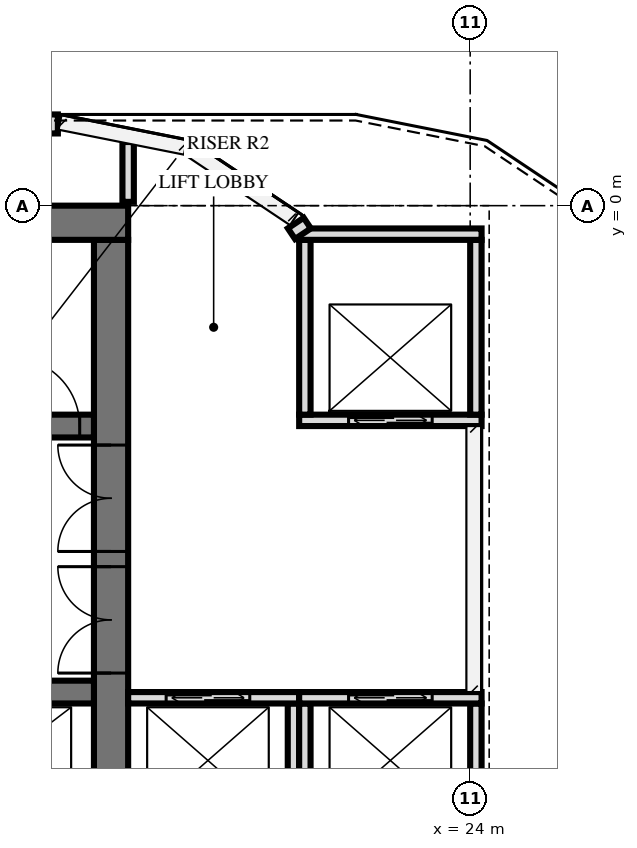
"""IFC4 building model, lengths in metres.
Left out: names, types, materials, properties, quantities, classifications, styles, units other than length and angle.
Written with IfcOpenShell. Run it as: python <this file> out.ifc"""

import sys

from ifc_helpers import new_model, si_unit, direction, frame, frame_2d, origin, place, context, subcontext, project, spatial, rectangle, extrude, element, fill, save


model = new_model("IFC4")
c1 = context("Model", 3, precision=1e-05, world=origin(), true_north=direction((0.0, 1.0)))
c2 = subcontext(c1, "Body", "Model", "MODEL_VIEW")
j1 = project(units=[si_unit("LENGTHUNIT", "METRE"), si_unit("PLANEANGLEUNIT", "RADIAN")], contexts=[c1])
p1 = place(None, origin())
s1 = spatial("IfcSite", under=j1, at=p1, CompositionType="ELEMENT")
p2 = place(p1, origin())
s2 = spatial("IfcBuilding", under=s1, at=p2, CompositionType="ELEMENT")
p3 = place(p2, frame((0.0, 0.0, 246.6)))
s3 = spatial("IfcBuildingStorey", under=s2, at=p3, CompositionType="ELEMENT", Elevation=246.6)
p4 = place(p3, frame((10.0, -0.225, 0.0), z_axis=(0.0, 0.0, 1.0), x_axis=(1.0, 0.0, 0.0)))
e1 = element("IfcWall", 1, at=p4, inside=s3, PredefinedType="SHEAR", context=c2, shape_type="SweptSolid", body=[
    extrude(rectangle(XDim=9.5, YDim=0.45, at=frame_2d((4.75, 0.0))), origin(), (0.0, 0.0, 1.0), 6.0),
])
p5 = place(p3, frame((19.275, -14.55, 0.0), z_axis=(0.0, 0.0, 1.0), x_axis=(0.0, 1.0, 0.0)))
e2 = element("IfcWall", 2, at=p5, inside=s3, PredefinedType="SHEAR", context=c2, shape_type="SweptSolid", body=[
    extrude(rectangle(XDim=14.1, YDim=0.45, at=frame_2d((7.05, 0.0))), origin(), (0.0, 0.0, 1.0), 6.0),
])
p6 = place(p5, frame((8.4, 0.0, 0.0)))
e3 = element("IfcOpeningElement", 3, at=p6, cuts=e2, PredefinedType="OPENING", context=c2, shape_type="SweptSolid", body=[
    extrude(rectangle(XDim=1.4, YDim=2.4, at=frame_2d((0.7, 1.2))), frame((0.0, 0.235, 0.0), z_axis=(0.0, -1.0, 0.0), x_axis=(1.0, 0.0, 0.0)), (0.0, 0.0, 1.0), 0.47),
])
p7 = place(p5, frame((10.0, 0.0, 0.0)))
e4 = element("IfcOpeningElement", 4, at=p7, cuts=e2, PredefinedType="OPENING", context=c2, shape_type="SweptSolid", body=[
    extrude(rectangle(XDim=1.4, YDim=2.4, at=frame_2d((0.7, 1.2))), frame((0.0, 0.235, 0.0), z_axis=(0.0, -1.0, 0.0), x_axis=(1.0, 0.0, 0.0)), (0.0, 0.0, 1.0), 0.47),
])
p8 = place(p3, frame((10.35, -2.9, 0.0), z_axis=(0.0, 0.0, 1.0), x_axis=(1.0, 0.0, 0.0)))
e5 = element("IfcWall", 5, at=p8, inside=s3, PredefinedType="SHEAR", context=c2, shape_type="SweptSolid", body=[
    extrude(rectangle(XDim=8.7, YDim=0.3, at=frame_2d((4.35, 0.0))), origin(), (0.0, 0.0, 1.0), 6.0),
])
p9 = place(p8, frame((0.8, 0.0, 0.0)))
e6 = element("IfcOpeningElement", 6, at=p9, cuts=e5, PredefinedType="OPENING", context=c2, shape_type="SweptSolid", body=[
    extrude(rectangle(XDim=1.1, YDim=2.1, at=frame_2d((0.55, 1.05))), frame((0.0, 0.16, 0.0), z_axis=(0.0, -1.0, 0.0), x_axis=(1.0, 0.0, 0.0)), (0.0, 0.0, 1.0), 0.32),
])
p10 = place(p8, frame((3.8, 0.0, 0.0)))
e7 = element("IfcOpeningElement", 7, at=p10, cuts=e5, PredefinedType="OPENING", context=c2, shape_type="SweptSolid", body=[
    extrude(rectangle(XDim=1.1, YDim=2.1, at=frame_2d((0.55, 1.05))), frame((0.0, 0.16, 0.0), z_axis=(0.0, -1.0, 0.0), x_axis=(1.0, 0.0, 0.0)), (0.0, 0.0, 1.0), 0.32),
])
p11 = place(p8, frame((6.188, 0.0, 0.0)))
e8 = element("IfcOpeningElement", 8, at=p11, cuts=e5, PredefinedType="OPENING", context=c2, shape_type="SweptSolid", body=[
    extrude(rectangle(XDim=0.9, YDim=2.1, at=frame_2d((0.45, 1.05))), frame((0.0, 0.16, 0.0), z_axis=(0.0, -1.0, 0.0), x_axis=(1.0, 0.0, 0.0)), (0.0, 0.0, 1.0), 0.32),
])
p12 = place(p8, frame((7.613, 0.0, 0.0)))
e9 = element("IfcOpeningElement", 9, at=p12, cuts=e5, PredefinedType="OPENING", context=c2, shape_type="SweptSolid", body=[
    extrude(rectangle(XDim=0.9, YDim=2.1, at=frame_2d((0.45, 1.05))), frame((0.0, 0.16, 0.0), z_axis=(0.0, -1.0, 0.0), x_axis=(1.0, 0.0, 0.0)), (0.0, 0.0, 1.0), 0.32),
])
p13 = place(p3, frame((10.35, -6.4, 0.0), z_axis=(0.0, 0.0, 1.0), x_axis=(1.0, 0.0, 0.0)))
e10 = element("IfcWall", 10, at=p13, inside=s3, PredefinedType="SHEAR", context=c2, shape_type="SweptSolid", body=[
    extrude(rectangle(XDim=8.7, YDim=0.3, at=frame_2d((4.35, 0.0))), origin(), (0.0, 0.0, 1.0), 6.0),
])
p14 = place(p13, frame((6.8, 0.0, 0.0)))
e11 = element("IfcOpeningElement", 11, at=p14, cuts=e10, PredefinedType="OPENING", context=c2, shape_type="SweptSolid", body=[
    extrude(rectangle(XDim=1.1, YDim=2.1, at=frame_2d((0.55, 1.05))), frame((0.0, 0.16, 0.0), z_axis=(0.0, -1.0, 0.0), x_axis=(1.0, 0.0, 0.0)), (0.0, 0.0, 1.0), 0.32),
])
p15 = place(p3, frame((21.8, -0.369, 0.0), z_axis=(0.0, 0.0, 1.0), x_axis=(-0.555699055242, 0.831383521609, 0.0)))
e12 = element("IfcWall", 12, at=p15, inside=s3, PredefinedType="SOLIDWALL", context=c2, shape_type="SweptSolid", body=[
    extrude(rectangle(XDim=0.169, YDim=0.25, at=frame_2d((0.084, 0.0))), origin(), (0.0, 0.0, 1.0), 5.72),
])
p16 = place(p3, frame((18.575, 1.075, 0.0), z_axis=(0.0, 0.0, 1.0), x_axis=(-1.0, 0.0, 0.0)))
e13 = element("IfcWall", 13, at=p16, inside=s3, PredefinedType="SOLIDWALL", context=c2, shape_type="SweptSolid", body=[
    extrude(rectangle(XDim=37.151, YDim=0.25, at=frame_2d((18.575, 0.0))), origin(), (0.0, 0.0, 1.0), 5.72),
])
p17 = place(p16, frame((0.348, 0.0, 0.858)))
e14 = element("IfcOpeningElement", 14, at=p17, cuts=e13, PredefinedType="OPENING", context=c2, shape_type="SweptSolid", body=[
    extrude(rectangle(XDim=2.4, YDim=3.6, at=frame_2d((1.2, 1.8))), frame((0.0, 0.135, 0.0), z_axis=(0.0, -1.0, 0.0), x_axis=(1.0, 0.0, 0.0)), (0.0, 0.0, 1.0), 0.27),
])
p18 = place(p16, frame((3.444, 0.0, 0.858)))
e15 = element("IfcOpeningElement", 15, at=p18, cuts=e13, PredefinedType="OPENING", context=c2, shape_type="SweptSolid", body=[
    extrude(rectangle(XDim=2.4, YDim=3.6, at=frame_2d((1.2, 1.8))), frame((0.0, 0.135, 0.0), z_axis=(0.0, -1.0, 0.0), x_axis=(1.0, 0.0, 0.0)), (0.0, 0.0, 1.0), 0.27),
])
p19 = place(p16, frame((6.54, 0.0, 0.858)))
e16 = element("IfcOpeningElement", 16, at=p19, cuts=e13, PredefinedType="OPENING", context=c2, shape_type="SweptSolid", body=[
    extrude(rectangle(XDim=2.4, YDim=3.6, at=frame_2d((1.2, 1.8))), frame((0.0, 0.135, 0.0), z_axis=(0.0, -1.0, 0.0), x_axis=(1.0, 0.0, 0.0)), (0.0, 0.0, 1.0), 0.27),
])
p20 = place(p16, frame((9.635, 0.0, 0.858)))
e17 = element("IfcOpeningElement", 17, at=p20, cuts=e13, PredefinedType="OPENING", context=c2, shape_type="SweptSolid", body=[
    extrude(rectangle(XDim=2.4, YDim=3.6, at=frame_2d((1.2, 1.8))), frame((0.0, 0.135, 0.0), z_axis=(0.0, -1.0, 0.0), x_axis=(1.0, 0.0, 0.0)), (0.0, 0.0, 1.0), 0.27),
])
p21 = place(p16, frame((12.731, 0.0, 0.858)))
e18 = element("IfcOpeningElement", 18, at=p21, cuts=e13, PredefinedType="OPENING", context=c2, shape_type="SweptSolid", body=[
    extrude(rectangle(XDim=2.4, YDim=3.6, at=frame_2d((1.2, 1.8))), frame((0.0, 0.135, 0.0), z_axis=(0.0, -1.0, 0.0), x_axis=(1.0, 0.0, 0.0)), (0.0, 0.0, 1.0), 0.27),
])
p22 = place(p16, frame((15.827, 0.0, 0.858)))
e19 = element("IfcOpeningElement", 19, at=p22, cuts=e13, PredefinedType="OPENING", context=c2, shape_type="SweptSolid", body=[
    extrude(rectangle(XDim=2.4, YDim=3.6, at=frame_2d((1.2, 1.8))), frame((0.0, 0.135, 0.0), z_axis=(0.0, -1.0, 0.0), x_axis=(1.0, 0.0, 0.0)), (0.0, 0.0, 1.0), 0.27),
])
p23 = place(p16, frame((18.923, 0.0, 0.858)))
e20 = element("IfcOpeningElement", 20, at=p23, cuts=e13, PredefinedType="OPENING", context=c2, shape_type="SweptSolid", body=[
    extrude(rectangle(XDim=2.4, YDim=3.6, at=frame_2d((1.2, 1.8))), frame((0.0, 0.135, 0.0), z_axis=(0.0, -1.0, 0.0), x_axis=(1.0, 0.0, 0.0)), (0.0, 0.0, 1.0), 0.27),
])
p24 = place(p16, frame((22.019, 0.0, 0.858)))
e21 = element("IfcOpeningElement", 21, at=p24, cuts=e13, PredefinedType="OPENING", context=c2, shape_type="SweptSolid", body=[
    extrude(rectangle(XDim=2.4, YDim=3.6, at=frame_2d((1.2, 1.8))), frame((0.0, 0.135, 0.0), z_axis=(0.0, -1.0, 0.0), x_axis=(1.0, 0.0, 0.0)), (0.0, 0.0, 1.0), 0.27),
])
p25 = place(p16, frame((25.115, 0.0, 0.858)))
e22 = element("IfcOpeningElement", 22, at=p25, cuts=e13, PredefinedType="OPENING", context=c2, shape_type="SweptSolid", body=[
    extrude(rectangle(XDim=2.4, YDim=3.6, at=frame_2d((1.2, 1.8))), frame((0.0, 0.135, 0.0), z_axis=(0.0, -1.0, 0.0), x_axis=(1.0, 0.0, 0.0)), (0.0, 0.0, 1.0), 0.27),
])
p26 = place(p16, frame((28.211, 0.0, 0.858)))
e23 = element("IfcOpeningElement", 23, at=p26, cuts=e13, PredefinedType="OPENING", context=c2, shape_type="SweptSolid", body=[
    extrude(rectangle(XDim=2.4, YDim=3.6, at=frame_2d((1.2, 1.8))), frame((0.0, 0.135, 0.0), z_axis=(0.0, -1.0, 0.0), x_axis=(1.0, 0.0, 0.0)), (0.0, 0.0, 1.0), 0.27),
])
p27 = place(p16, frame((31.307, 0.0, 0.858)))
e24 = element("IfcOpeningElement", 24, at=p27, cuts=e13, PredefinedType="OPENING", context=c2, shape_type="SweptSolid", body=[
    extrude(rectangle(XDim=2.4, YDim=3.6, at=frame_2d((1.2, 1.8))), frame((0.0, 0.135, 0.0), z_axis=(0.0, -1.0, 0.0), x_axis=(1.0, 0.0, 0.0)), (0.0, 0.0, 1.0), 0.27),
])
p28 = place(p16, frame((34.403, 0.0, 0.858)))
e25 = element("IfcOpeningElement", 25, at=p28, cuts=e13, PredefinedType="OPENING", context=c2, shape_type="SweptSolid", body=[
    extrude(rectangle(XDim=2.4, YDim=3.6, at=frame_2d((1.2, 1.8))), frame((0.0, 0.135, 0.0), z_axis=(0.0, -1.0, 0.0), x_axis=(1.0, 0.0, 0.0)), (0.0, 0.0, 1.0), 0.27),
])
p29 = place(p3, frame((19.5, -6.475, 0.0), z_axis=(0.0, 0.0, 1.0), x_axis=(1.0, 0.0, 0.0)))
e26 = element("IfcWall", 26, at=p29, inside=s3, PredefinedType="PARTITIONING", context=c2, shape_type="SweptSolid", body=[
    extrude(rectangle(XDim=2.25, YDim=0.15, at=frame_2d((1.125, 0.0))), origin(), (0.0, 0.0, 1.0), 5.2),
])
p30 = place(p29, frame((0.5, 0.0, 0.0)))
e27 = element("IfcOpeningElement", 27, at=p30, cuts=e26, PredefinedType="OPENING", context=c2, shape_type="SweptSolid", body=[
    extrude(rectangle(XDim=1.1, YDim=2.1, at=frame_2d((0.55, 1.05))), frame((0.0, 0.085, 0.0), z_axis=(0.0, -1.0, 0.0), x_axis=(1.0, 0.0, 0.0)), (0.0, 0.0, 1.0), 0.17),
])
p31 = place(p3, frame((21.675, -8.85, 0.0), z_axis=(0.0, 0.0, 1.0), x_axis=(0.0, 1.0, 0.0)))
e28 = element("IfcWall", 28, at=p31, inside=s3, PredefinedType="PARTITIONING", context=c2, shape_type="SweptSolid", body=[
    extrude(rectangle(XDim=2.3, YDim=0.15, at=frame_2d((1.15, 0.0))), origin(), (0.0, 0.0, 1.0), 5.2),
])
p32 = place(p3, frame((21.75, -2.825, 0.0), z_axis=(0.0, 0.0, 1.0), x_axis=(1.0, 0.0, 0.0)))
e29 = element("IfcWall", 29, at=p32, inside=s3, PredefinedType="PARTITIONING", context=c2, shape_type="SweptSolid", body=[
    extrude(rectangle(XDim=2.4, YDim=0.15, at=frame_2d((1.2, 0.0))), origin(), (0.0, 0.0, 1.0), 4.6),
])
p33 = place(p32, frame((0.65, 0.0, 0.0)))
e30 = element("IfcOpeningElement", 30, at=p33, cuts=e29, PredefinedType="OPENING", context=c2, shape_type="SweptSolid", body=[
    extrude(rectangle(XDim=1.1, YDim=2.1, at=frame_2d((0.55, 1.05))), frame((0.0, 0.085, 0.0), z_axis=(0.0, -1.0, 0.0), x_axis=(1.0, 0.0, 0.0)), (0.0, 0.0, 1.0), 0.17),
])
p34 = place(p3, frame((21.75, -0.375, 0.0), z_axis=(0.0, 0.0, 1.0), x_axis=(1.0, 0.0, 0.0)))
e31 = element("IfcWall", 31, at=p34, inside=s3, PredefinedType="PARTITIONING", context=c2, shape_type="SweptSolid", body=[
    extrude(rectangle(XDim=2.4, YDim=0.15, at=frame_2d((1.2, 0.0))), origin(), (0.0, 0.0, 1.0), 5.72),
])
p35 = place(p3, frame((21.825, -2.75, 0.0), z_axis=(0.0, 0.0, 1.0), x_axis=(0.0, 1.0, 0.0)))
e32 = element("IfcWall", 32, at=p35, inside=s3, PredefinedType="PARTITIONING", context=c2, shape_type="SweptSolid", body=[
    extrude(rectangle(XDim=2.3, YDim=0.15, at=frame_2d((1.15, 0.0))), origin(), (0.0, 0.0, 1.0), 4.6),
])
p36 = place(p3, frame((24.075, -2.75, 0.0), z_axis=(0.0, 0.0, 1.0), x_axis=(0.0, 1.0, 0.0)))
e33 = element("IfcWall", 33, at=p36, inside=s3, PredefinedType="PARTITIONING", context=c2, shape_type="SweptSolid", body=[
    extrude(rectangle(XDim=2.3, YDim=0.15, at=frame_2d((1.15, 0.0))), origin(), (0.0, 0.0, 1.0), 5.72),
])
p37 = place(p3, frame((21.75, -6.475, 0.0), z_axis=(0.0, 0.0, 1.0), x_axis=(1.0, 0.0, 0.0)))
e34 = element("IfcWall", 34, at=p37, inside=s3, PredefinedType="PARTITIONING", context=c2, shape_type="SweptSolid", body=[
    extrude(rectangle(XDim=2.4, YDim=0.15, at=frame_2d((1.2, 0.0))), origin(), (0.0, 0.0, 1.0), 4.6),
])
p38 = place(p37, frame((0.65, 0.0, 0.0)))
e35 = element("IfcOpeningElement", 35, at=p38, cuts=e34, PredefinedType="OPENING", context=c2, shape_type="SweptSolid", body=[
    extrude(rectangle(XDim=1.1, YDim=2.1, at=frame_2d((0.55, 1.05))), frame((0.0, 0.085, 0.0), z_axis=(0.0, -1.0, 0.0), x_axis=(1.0, 0.0, 0.0)), (0.0, 0.0, 1.0), 0.17),
])
p39 = place(p3, frame((21.825, -8.85, 0.0), z_axis=(0.0, 0.0, 1.0), x_axis=(0.0, 1.0, 0.0)))
e36 = element("IfcWall", 36, at=p39, inside=s3, PredefinedType="PARTITIONING", context=c2, shape_type="SweptSolid", body=[
    extrude(rectangle(XDim=2.3, YDim=0.15, at=frame_2d((1.15, 0.0))), origin(), (0.0, 0.0, 1.0), 4.6),
])
p40 = place(p3, frame((24.075, -8.85, 0.0), z_axis=(0.0, 0.0, 1.0), x_axis=(0.0, 1.0, 0.0)))
e37 = element("IfcWall", 37, at=p40, inside=s3, PredefinedType="PARTITIONING", context=c2, shape_type="SweptSolid", body=[
    extrude(rectangle(XDim=2.3, YDim=0.15, at=frame_2d((1.15, 0.0))), origin(), (0.0, 0.0, 1.0), 5.72),
])
p41 = place(p3, frame((19.5, 0.05, 0.0), z_axis=(0.0, 0.0, 1.0), x_axis=(0.0, 1.0, 0.0)))
e38 = element("IfcWall", 38, at=p41, inside=s3, PredefinedType="PARTITIONING", context=c2, shape_type="SweptSolid", body=[
    extrude(rectangle(XDim=0.787, YDim=0.15, at=frame_2d((0.394, 0.0))), origin(), (0.0, 0.0, 1.0), 5.7),
])
p42 = place(p30, origin())
e39 = element("IfcDoor", 39, at=p42, inside=s3, OperationType="DOUBLE_DOOR_SLIDING", PredefinedType="USERDEFINED", context=c2, shape_type="SweptSolid", body=[
    extrude(rectangle(XDim=1.1, YDim=2.1, at=frame_2d((0.55, 1.05))), frame((0.0, 0.025, 0.0), z_axis=(0.0, -1.0, 0.0), x_axis=(1.0, 0.0, 0.0)), (0.0, 0.0, 1.0), 0.05),
])
fill(e27, e39)
p43 = place(p33, origin())
e40 = element("IfcDoor", 40, at=p43, inside=s3, OperationType="DOUBLE_DOOR_SLIDING", PredefinedType="USERDEFINED", context=c2, shape_type="SweptSolid", body=[
    extrude(rectangle(XDim=1.1, YDim=2.1, at=frame_2d((0.55, 1.05))), frame((0.0, 0.025, 0.0), z_axis=(0.0, -1.0, 0.0), x_axis=(1.0, 0.0, 0.0)), (0.0, 0.0, 1.0), 0.05),
])
fill(e30, e40)
p44 = place(p38, origin())
e41 = element("IfcDoor", 41, at=p44, inside=s3, OperationType="DOUBLE_DOOR_SLIDING", PredefinedType="USERDEFINED", context=c2, shape_type="SweptSolid", body=[
    extrude(rectangle(XDim=1.1, YDim=2.1, at=frame_2d((0.55, 1.05))), frame((0.0, 0.025, 0.0), z_axis=(0.0, -1.0, 0.0), x_axis=(1.0, 0.0, 0.0)), (0.0, 0.0, 1.0), 0.05),
])
fill(e35, e41)
p45 = place(p6, origin())
e42 = element("IfcDoor", 42, at=p45, inside=s3, OperationType="DOUBLE_DOOR_SINGLE_SWING", PredefinedType="DOOR", context=c2, shape_type="SweptSolid", body=[
    extrude(rectangle(XDim=1.4, YDim=2.4, at=frame_2d((0.7, 1.2))), frame((0.0, 0.025, 0.0), z_axis=(0.0, -1.0, 0.0), x_axis=(1.0, 0.0, 0.0)), (0.0, 0.0, 1.0), 0.05),
])
fill(e3, e42)
p46 = place(p7, origin())
e43 = element("IfcDoor", 43, at=p46, inside=s3, OperationType="DOUBLE_DOOR_SINGLE_SWING", PredefinedType="DOOR", context=c2, shape_type="SweptSolid", body=[
    extrude(rectangle(XDim=1.4, YDim=2.4, at=frame_2d((0.7, 1.2))), frame((0.0, 0.025, 0.0), z_axis=(0.0, -1.0, 0.0), x_axis=(1.0, 0.0, 0.0)), (0.0, 0.0, 1.0), 0.05),
])
fill(e4, e43)
p47 = place(p12, origin())
e44 = element("IfcDoor", 44, at=p47, inside=s3, OperationType="SINGLE_SWING_RIGHT", PredefinedType="DOOR", context=c2, shape_type="SweptSolid", body=[
    extrude(rectangle(XDim=0.9, YDim=2.1, at=frame_2d((0.45, 1.05))), frame((0.0, 0.025, 0.0), z_axis=(0.0, -1.0, 0.0), x_axis=(1.0, 0.0, 0.0)), (0.0, 0.0, 1.0), 0.05),
])
fill(e9, e44)
save(model, sys.argv[1])
